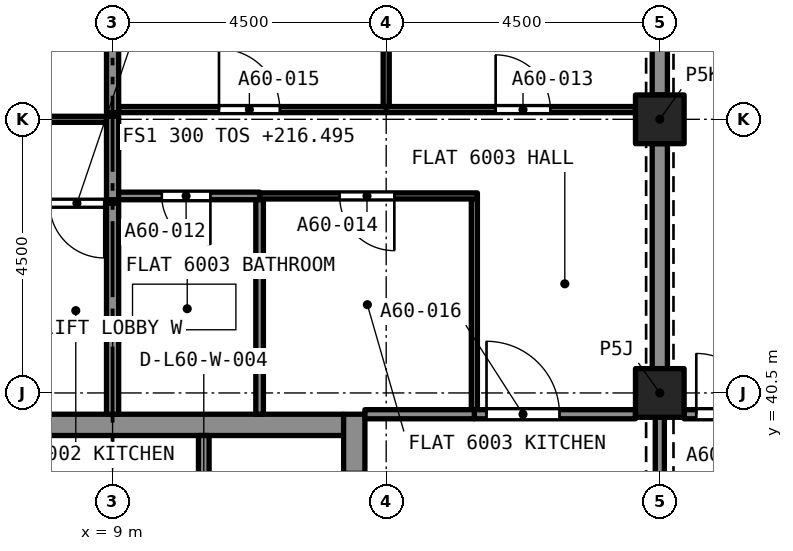
"""IFC4 building model, lengths in metres.
Left out: names, types, materials, properties, quantities, classifications, styles, units other than length and angle.
Written with IfcOpenShell. Run it as: python <this file> out.ifc"""

import sys

from ifc_helpers import new_model, si_unit, direction, frame, frame_2d, origin, origin_2d, place, context, subcontext, project, spatial, rectangle, extrude, element, fill, save


model = new_model("IFC4")
c1 = context("Model", 3, precision=1e-05, world=origin(), true_north=direction((0.0, 1.0)))
c2 = subcontext(c1, "Body", "Model", "MODEL_VIEW")
j1 = project(units=[si_unit("LENGTHUNIT", "METRE"), si_unit("PLANEANGLEUNIT", "RADIAN")], contexts=[c1])
p1 = place(None, origin())
s1 = spatial("IfcSite", under=j1, at=p1, CompositionType="ELEMENT")
p2 = place(p1, origin())
s2 = spatial("IfcBuilding", under=s1, at=p2, CompositionType="ELEMENT")
p3 = place(p2, frame((0.0, 0.0, 216.495)))
s3 = spatial("IfcBuildingStorey", under=s2, at=p3, CompositionType="ELEMENT", Elevation=216.495)
for number, where, z_axis, x_axis in (
    (1, (18.0, 40.5, 0.0), (0.0, 0.0, 1.0), (1.0, 0.0, 0.0)),
    (2, (18.0, 45.0, 0.0), (0.0, 0.0, 1.0), (1.0, 0.0, 0.0)),
):
    element("IfcColumn", number, at=place(p3, frame(where, z_axis=z_axis, x_axis=x_axis)), inside=s3, PredefinedType="COLUMN", context=c2, shape_type="SweptSolid", body=[
        extrude(rectangle(XDim=0.8, YDim=0.8, at=origin_2d()), origin(), (0.0, 0.0, 1.0), 3.2),
    ])
p4 = place(p3, frame((5.2, 39.975, 0.0), z_axis=(0.0, 0.0, 1.0), x_axis=(1.0, 0.0, 0.0)))
e3 = element("IfcWall", 3, at=p4, inside=s3, PredefinedType="SOLIDWALL", context=c2, shape_type="SweptSolid", body=[
    extrude(rectangle(XDim=7.6, YDim=0.35, at=frame_2d((3.8, 0.0))), origin(), (0.0, 0.0, 1.0), 3.2),
])
p5 = place(p3, frame((12.975, 27.35, 0.0), z_axis=(0.0, 0.0, 1.0), x_axis=(0.0, 1.0, 0.0)))
e4 = element("IfcWall", 4, at=p5, inside=s3, PredefinedType="SOLIDWALL", context=c2, shape_type="SweptSolid", body=[
    extrude(rectangle(XDim=12.8, YDim=0.35, at=frame_2d((6.4, 0.0))), origin(), (0.0, 0.0, 1.0), 3.2),
])
p6 = place(p5, frame((10.75, 0.0, 0.0)))
e5 = element("IfcOpeningElement", 5, at=p6, cuts=e4, PredefinedType="OPENING", context=c2, shape_type="SweptSolid", body=[
    extrude(rectangle(XDim=1.1, YDim=2.1, at=frame_2d((0.55, 1.05))), frame((0.0, 0.185, 0.0), z_axis=(0.0, -1.0, 0.0), x_axis=(1.0, 0.0, 0.0)), (0.0, 0.0, 1.0), 0.37),
])
p7 = place(p5, frame((8.6, 0.0, 0.0)))
e6 = element("IfcOpeningElement", 6, at=p7, cuts=e4, PredefinedType="OPENING", context=c2, shape_type="SweptSolid", body=[
    extrude(rectangle(XDim=1.2, YDim=2.1, at=frame_2d((0.6, 1.05))), frame((0.0, 0.185, 0.0), z_axis=(0.0, -1.0, 0.0), x_axis=(1.0, 0.0, 0.0)), (0.0, 0.0, 1.0), 0.37),
])
p8 = place(p3, frame((4.5, 45.0, 0.0), z_axis=(0.0, 0.0, 1.0), x_axis=(1.0, 0.0, 0.0)))
e7 = element("IfcWall", 7, at=p8, inside=s3, PredefinedType="PARTITIONING", context=c2, shape_type="SweptSolid", body=[
    extrude(rectangle(XDim=4.4, YDim=0.1, at=frame_2d((2.2, 0.0))), origin(), (0.0, 0.0, 1.0), 2.9),
])
p9 = place(p8, frame((1.8, 0.0, 0.0)))
e8 = element("IfcOpeningElement", 8, at=p9, cuts=e7, PredefinedType="OPENING", context=c2, shape_type="SweptSolid", body=[
    extrude(rectangle(XDim=0.9, YDim=2.1, at=frame_2d((0.45, 1.05))), frame((0.0, 0.06, 0.0), z_axis=(0.0, -1.0, 0.0), x_axis=(1.0, 0.0, 0.0)), (0.0, 0.0, 1.0), 0.12),
])
p10 = place(p3, frame((9.0, 45.11, 0.0), z_axis=(0.0, 0.0, 1.0), x_axis=(0.0, 1.0, 0.0)))
e9 = element("IfcWall", 9, at=p10, inside=s3, PredefinedType="PARTITIONING", context=c2, shape_type="SweptSolid", body=[
    extrude(rectangle(XDim=3.99, YDim=0.2, at=frame_2d((1.995, 0.0))), origin(), (0.0, 0.0, 1.0), 2.9),
])
p11 = place(p3, frame((9.0, 43.62, 0.0), z_axis=(0.0, 0.0, 1.0), x_axis=(-1.0, 0.0, 0.0)))
e10 = element("IfcWall", 10, at=p11, inside=s3, PredefinedType="PARTITIONING", context=c2, shape_type="SweptSolid", body=[
    extrude(rectangle(XDim=1.173, YDim=0.1, at=frame_2d((0.586, 0.0))), origin(), (0.0, 0.0, 1.0), 2.9),
])
p12 = place(p11, frame((0.136, 0.0, 0.0)))
e11 = element("IfcOpeningElement", 11, at=p12, cuts=e10, PredefinedType="OPENING", context=c2, shape_type="SweptSolid", body=[
    extrude(rectangle(XDim=0.9, YDim=2.1, at=frame_2d((0.45, 1.05))), frame((0.0, 0.06, 0.0), z_axis=(0.0, -1.0, 0.0), x_axis=(1.0, 0.0, 0.0)), (0.0, 0.0, 1.0), 0.12),
])
p13 = place(p3, frame((9.0, 43.677, 0.0), z_axis=(0.0, 0.0, 1.0), x_axis=(0.0, 1.0, 0.0)))
e12 = element("IfcWall", 12, at=p13, inside=s3, PredefinedType="PARTITIONING", context=c2, shape_type="SweptSolid", body=[
    extrude(rectangle(XDim=1.373, YDim=0.2, at=frame_2d((0.686, 0.0))), origin(), (0.0, 0.0, 1.0), 2.9),
])
p14 = place(p3, frame((9.0, 40.15, 0.0), z_axis=(0.0, 0.0, 1.0), x_axis=(0.0, 1.0, 0.0)))
e13 = element("IfcWall", 13, at=p14, inside=s3, PredefinedType="PARTITIONING", context=c2, shape_type="SweptSolid", body=[
    extrude(rectangle(XDim=3.47, YDim=0.2, at=frame_2d((1.735, 0.0))), origin(), (0.0, 0.0, 1.0), 2.9),
])
p15 = place(p3, frame((11.418, 43.74, 0.0), z_axis=(0.0, 0.0, 1.0), x_axis=(-1.0, 0.0, 0.0)))
e14 = element("IfcWall", 14, at=p15, inside=s3, PredefinedType="PARTITIONING", context=c2, shape_type="SweptSolid", body=[
    extrude(rectangle(XDim=2.318, YDim=0.125, at=frame_2d((1.159, 0.0))), origin(), (0.0, 0.0, 1.0), 2.9),
])
p16 = place(p15, frame((0.809, 0.0, 0.0)))
e15 = element("IfcOpeningElement", 15, at=p16, cuts=e14, PredefinedType="OPENING", context=c2, shape_type="SweptSolid", body=[
    extrude(rectangle(XDim=0.8, YDim=2.1, at=frame_2d((0.4, 1.05))), frame((0.0, 0.073, 0.0), z_axis=(0.0, -1.0, 0.0), x_axis=(1.0, 0.0, 0.0)), (0.0, 0.0, 1.0), 0.145),
])
p17 = place(p3, frame((11.418, 40.15, 0.0), z_axis=(0.0, 0.0, 1.0), x_axis=(0.0, 1.0, 0.0)))
e16 = element("IfcWall", 16, at=p17, inside=s3, PredefinedType="PARTITIONING", context=c2, shape_type="SweptSolid", body=[
    extrude(rectangle(XDim=3.528, YDim=0.125, at=frame_2d((1.764, 0.0))), origin(), (0.0, 0.0, 1.0), 2.9),
])
p18 = place(p3, frame((13.5, 45.16, 0.0), z_axis=(0.0, 0.0, 1.0), x_axis=(1.0, 0.0, 0.0)))
e17 = element("IfcWall", 17, at=p18, inside=s3, PredefinedType="PARTITIONING", context=c2, shape_type="SweptSolid", body=[
    extrude(rectangle(XDim=4.1, YDim=0.1, at=frame_2d((2.05, 0.0))), origin(), (0.0, 0.0, 1.0), 2.9),
])
p19 = place(p18, frame((1.8, 0.0, 0.0)))
e18 = element("IfcOpeningElement", 18, at=p19, cuts=e17, PredefinedType="OPENING", context=c2, shape_type="SweptSolid", body=[
    extrude(rectangle(XDim=0.9, YDim=2.1, at=frame_2d((0.45, 1.05))), frame((0.0, 0.06, 0.0), z_axis=(0.0, -1.0, 0.0), x_axis=(1.0, 0.0, 0.0)), (0.0, 0.0, 1.0), 0.12),
])
p20 = place(p3, frame((13.5, 45.21, 0.0), z_axis=(0.0, 0.0, 1.0), x_axis=(0.0, 1.0, 0.0)))
e19 = element("IfcWall", 19, at=p20, inside=s3, PredefinedType="PARTITIONING", context=c2, shape_type="SweptSolid", body=[
    extrude(rectangle(XDim=3.89, YDim=0.1, at=frame_2d((1.945, 0.0))), origin(), (0.0, 0.0, 1.0), 2.9),
])
p21 = place(p3, frame((18.0, 45.4, 0.0), z_axis=(0.0, 0.0, 1.0), x_axis=(0.0, 1.0, 0.0)))
e20 = element("IfcWall", 20, at=p21, inside=s3, PredefinedType="PARTITIONING", context=c2, shape_type="SweptSolid", body=[
    extrude(rectangle(XDim=3.7, YDim=0.25, at=frame_2d((1.85, 0.0))), origin(), (0.0, 0.0, 1.0), 2.38),
])
p22 = place(p3, frame((14.95, 40.225, 0.0), z_axis=(0.0, 0.0, 1.0), x_axis=(0.0, 1.0, 0.0)))
e21 = element("IfcWall", 21, at=p22, inside=s3, PredefinedType="PARTITIONING", context=c2, shape_type="SweptSolid", body=[
    extrude(rectangle(XDim=3.465, YDim=0.1, at=frame_2d((1.732, 0.0))), origin(), (0.0, 0.0, 1.0), 2.9),
])
p23 = place(p3, frame((15.0, 43.74, 0.0), z_axis=(0.0, 0.0, 1.0), x_axis=(-1.0, 0.0, 0.0)))
e22 = element("IfcWall", 22, at=p23, inside=s3, PredefinedType="PARTITIONING", context=c2, shape_type="SweptSolid", body=[
    extrude(rectangle(XDim=3.582, YDim=0.1, at=frame_2d((1.791, 0.0))), origin(), (0.0, 0.0, 1.0), 2.9),
])
p24 = place(p23, frame((1.366, 0.0, 0.0)))
e23 = element("IfcOpeningElement", 23, at=p24, cuts=e22, PredefinedType="OPENING", context=c2, shape_type="SweptSolid", body=[
    extrude(rectangle(XDim=0.9, YDim=2.1, at=frame_2d((0.45, 1.05))), frame((0.0, 0.06, 0.0), z_axis=(0.0, -1.0, 0.0), x_axis=(1.0, 0.0, 0.0)), (0.0, 0.0, 1.0), 0.12),
])
p25 = place(p3, frame((9.1, 45.16, 0.0), z_axis=(0.0, 0.0, 1.0), x_axis=(1.0, 0.0, 0.0)))
e24 = element("IfcWall", 24, at=p25, inside=s3, PredefinedType="PARTITIONING", context=c2, shape_type="SweptSolid", body=[
    extrude(rectangle(XDim=4.4, YDim=0.1, at=frame_2d((2.2, 0.0))), origin(), (0.0, 0.0, 1.0), 2.9),
])
p26 = place(p25, frame((1.65, 0.0, 0.0)))
e25 = element("IfcOpeningElement", 25, at=p26, cuts=e24, PredefinedType="OPENING", context=c2, shape_type="SweptSolid", body=[
    extrude(rectangle(XDim=1.0, YDim=2.1, at=frame_2d((0.5, 1.05))), frame((0.0, 0.06, 0.0), z_axis=(0.0, -1.0, 0.0), x_axis=(1.0, 0.0, 0.0)), (0.0, 0.0, 1.0), 0.12),
])
p27 = place(p3, frame((18.0, 40.9, 0.0), z_axis=(0.0, 0.0, 1.0), x_axis=(0.0, 1.0, 0.0)))
e26 = element("IfcWall", 26, at=p27, inside=s3, PredefinedType="PARTITIONING", context=c2, shape_type="SweptSolid", body=[
    extrude(rectangle(XDim=3.7, YDim=0.25, at=frame_2d((1.85, 0.0))), origin(), (0.0, 0.0, 1.0), 2.38),
])
p28 = place(p3, frame((14.95, 40.15, 0.0), z_axis=(0.0, 0.0, 1.0), x_axis=(1.0, 0.0, 0.0)))
e27 = element("IfcWall", 27, at=p28, inside=s3, PredefinedType="PARTITIONING", context=c2, shape_type="SweptSolid", body=[
    extrude(rectangle(XDim=2.65, YDim=0.15, at=frame_2d((1.325, 0.0))), origin(), (0.0, 0.0, 1.0), 2.9),
])
p29 = place(p28, frame((0.2, 0.0, 0.0)))
e28 = element("IfcOpeningElement", 28, at=p29, cuts=e27, PredefinedType="OPENING", context=c2, shape_type="SweptSolid", body=[
    extrude(rectangle(XDim=1.2, YDim=2.4, at=frame_2d((0.6, 1.2))), frame((0.0, 0.085, 0.0), z_axis=(0.0, -1.0, 0.0), x_axis=(1.0, 0.0, 0.0)), (0.0, 0.0, 1.0), 0.17),
])
p30 = place(p3, frame((13.15, 40.15, 0.0), z_axis=(0.0, 0.0, 1.0), x_axis=(1.0, 0.0, 0.0)))
e29 = element("IfcWall", 29, at=p30, inside=s3, PredefinedType="PARTITIONING", context=c2, shape_type="SweptSolid", body=[
    extrude(rectangle(XDim=1.8, YDim=0.15, at=frame_2d((0.9, 0.0))), origin(), (0.0, 0.0, 1.0), 2.9),
])
p31 = place(p3, frame((18.4, 40.15, 0.0), z_axis=(0.0, 0.0, 1.0), x_axis=(1.0, 0.0, 0.0)))
e30 = element("IfcWall", 30, at=p31, inside=s3, PredefinedType="PARTITIONING", context=c2, shape_type="SweptSolid", body=[
    extrude(rectangle(XDim=2.2, YDim=0.15, at=frame_2d((1.1, 0.0))), origin(), (0.0, 0.0, 1.0), 2.75),
])
p32 = place(p31, frame((0.2, 0.0, 0.0)))
e31 = element("IfcOpeningElement", 31, at=p32, cuts=e30, PredefinedType="OPENING", context=c2, shape_type="SweptSolid", body=[
    extrude(rectangle(XDim=1.0, YDim=2.1, at=frame_2d((0.5, 1.05))), frame((0.0, 0.085, 0.0), z_axis=(0.0, -1.0, 0.0), x_axis=(1.0, 0.0, 0.0)), (0.0, 0.0, 1.0), 0.17),
])
p33 = place(p3, frame((18.0, 40.1, 0.0), z_axis=(0.0, 0.0, 1.0), x_axis=(0.0, -1.0, 0.0)))
e32 = element("IfcWall", 32, at=p33, inside=s3, PredefinedType="PARTITIONING", context=c2, shape_type="SweptSolid", body=[
    extrude(rectangle(XDim=3.7, YDim=0.15, at=frame_2d((1.85, 0.0))), origin(), (0.0, 0.0, 1.0), 2.38),
])
p34 = place(p33, frame((1.25, 0.0, 0.0)))
e33 = element("IfcOpeningElement", 33, at=p34, cuts=e32, PredefinedType="OPENING", context=c2, shape_type="SweptSolid", body=[
    extrude(rectangle(XDim=1.2, YDim=2.1, at=frame_2d((0.6, 1.05))), frame((0.0, 0.085, 0.0), z_axis=(0.0, -1.0, 0.0), x_axis=(1.0, 0.0, 0.0)), (0.0, 0.0, 1.0), 0.17),
])
p35 = place(p3, frame((10.5, 37.5, 0.0), z_axis=(0.0, 0.0, 1.0), x_axis=(0.0, 1.0, 0.0)))
e34 = element("IfcWall", 34, at=p35, inside=s3, PredefinedType="SOLIDWALL", context=c2, shape_type="SweptSolid", body=[
    extrude(rectangle(XDim=2.3, YDim=0.175, at=frame_2d((1.15, 0.0))), origin(), (0.0, 0.0, 1.0), 2.9),
])
p36 = place(p35, frame((0.65, 0.0, 0.0)))
e35 = element("IfcOpeningElement", 35, at=p36, cuts=e34, PredefinedType="OPENING", context=c2, shape_type="SweptSolid", body=[
    extrude(rectangle(XDim=1.0, YDim=2.1, at=frame_2d((0.5, 1.05))), frame((0.0, 0.097, 0.0), z_axis=(0.0, -1.0, 0.0), x_axis=(1.0, 0.0, 0.0)), (0.0, 0.0, 1.0), 0.195),
])
p37 = place(p12, origin())
e36 = element("IfcDoor", 36, at=p37, inside=s3, OperationType="SINGLE_SWING_RIGHT", PredefinedType="DOOR", context=c2, shape_type="SweptSolid", body=[
    extrude(rectangle(XDim=0.9, YDim=2.1, at=frame_2d((0.45, 1.05))), frame((0.0, 0.025, 0.0), z_axis=(0.0, -1.0, 0.0), x_axis=(1.0, 0.0, 0.0)), (0.0, 0.0, 1.0), 0.05),
])
fill(e11, e36)
p38 = place(p16, origin())
e37 = element("IfcDoor", 37, at=p38, inside=s3, OperationType="SINGLE_SWING_RIGHT", PredefinedType="DOOR", context=c2, shape_type="SweptSolid", body=[
    extrude(rectangle(XDim=0.8, YDim=2.1, at=frame_2d((0.4, 1.05))), frame((0.0, 0.025, 0.0), z_axis=(0.0, -1.0, 0.0), x_axis=(1.0, 0.0, 0.0)), (0.0, 0.0, 1.0), 0.05),
])
fill(e15, e37)
p39 = place(p19, origin())
e38 = element("IfcDoor", 38, at=p39, inside=s3, OperationType="SINGLE_SWING_RIGHT", PredefinedType="DOOR", context=c2, shape_type="SweptSolid", body=[
    extrude(rectangle(XDim=0.9, YDim=2.1, at=frame_2d((0.45, 1.05))), frame((0.0, 0.025, 0.0), z_axis=(0.0, -1.0, 0.0), x_axis=(1.0, 0.0, 0.0)), (0.0, 0.0, 1.0), 0.05),
])
fill(e18, e38)
p40 = place(p24, origin())
e39 = element("IfcDoor", 39, at=p40, inside=s3, OperationType="SINGLE_SWING_RIGHT", PredefinedType="DOOR", context=c2, shape_type="SweptSolid", body=[
    extrude(rectangle(XDim=0.9, YDim=2.1, at=frame_2d((0.45, 1.05))), frame((0.0, 0.025, 0.0), z_axis=(0.0, -1.0, 0.0), x_axis=(1.0, 0.0, 0.0)), (0.0, 0.0, 1.0), 0.05),
])
fill(e23, e39)
p41 = place(p26, origin())
e40 = element("IfcDoor", 40, at=p41, inside=s3, OperationType="SINGLE_SWING_LEFT", PredefinedType="DOOR", context=c2, shape_type="SweptSolid", body=[
    extrude(rectangle(XDim=1.0, YDim=2.1, at=frame_2d((0.5, 1.05))), frame((0.0, 0.025, 0.0), z_axis=(0.0, -1.0, 0.0), x_axis=(1.0, 0.0, 0.0)), (0.0, 0.0, 1.0), 0.05),
])
fill(e25, e40)
p42 = place(p29, origin())
e41 = element("IfcDoor", 41, at=p42, inside=s3, OperationType="SINGLE_SWING_LEFT", PredefinedType="DOOR", context=c2, shape_type="SweptSolid", body=[
    extrude(rectangle(XDim=1.2, YDim=2.4, at=frame_2d((0.6, 1.2))), frame((0.0, 0.025, 0.0), z_axis=(0.0, -1.0, 0.0), x_axis=(1.0, 0.0, 0.0)), (0.0, 0.0, 1.0), 0.05),
])
fill(e28, e41)
p43 = place(p32, origin())
e42 = element("IfcDoor", 42, at=p43, inside=s3, OperationType="SINGLE_SWING_LEFT", PredefinedType="DOOR", context=c2, shape_type="SweptSolid", body=[
    extrude(rectangle(XDim=1.0, YDim=2.1, at=frame_2d((0.5, 1.05))), frame((0.0, 0.025, 0.0), z_axis=(0.0, -1.0, 0.0), x_axis=(1.0, 0.0, 0.0)), (0.0, 0.0, 1.0), 0.05),
])
fill(e31, e42)
save(model, sys.argv[1])
